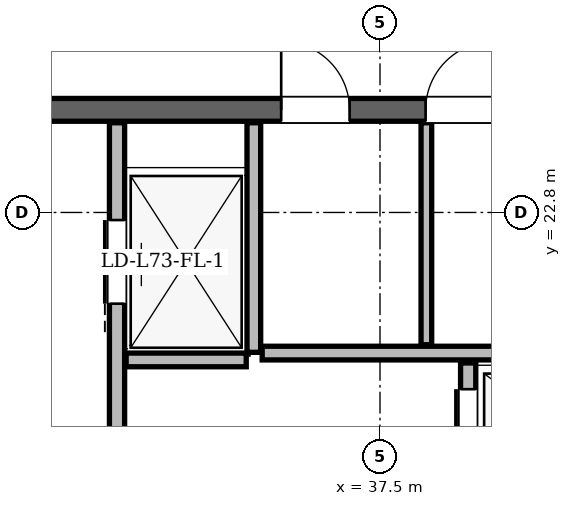
"""IFC4 building model, lengths in metres.
Left out: names, types, materials, properties, quantities, classifications, styles, units other than length and angle.
Written with IfcOpenShell. Run it as: python <this file> out.ifc"""

import sys

from ifc_helpers import new_model, si_unit, direction, frame, frame_2d, origin, place, context, subcontext, project, spatial, rectangle, extrude, element, fill, save


model = new_model("IFC4")
c1 = context("Model", 3, precision=1e-05, world=origin(), true_north=direction((0.0, 1.0)))
c2 = subcontext(c1, "Body", "Model", "MODEL_VIEW")
j1 = project(units=[si_unit("LENGTHUNIT", "METRE"), si_unit("PLANEANGLEUNIT", "RADIAN")], contexts=[c1])
p1 = place(None, origin())
s1 = spatial("IfcSite", under=j1, at=p1, CompositionType="ELEMENT")
p2 = place(p1, origin())
s2 = spatial("IfcBuilding", under=s1, at=p2, CompositionType="ELEMENT")
p3 = place(p2, frame((0.0, 0.0, 277.2)))
s3 = spatial("IfcBuildingStorey", under=s2, at=p3, CompositionType="ELEMENT", Elevation=277.2)
p4 = place(p3, frame((29.65, 24.15, 0.0), z_axis=(0.0, 0.0, 1.0), x_axis=(1.0, 0.0, 0.0)))
e1 = element("IfcWall", 1, at=p4, inside=s3, PredefinedType="SHEAR", context=c2, shape_type="SweptSolid", body=[
    extrude(rectangle(XDim=15.7, YDim=0.3, at=frame_2d((7.85, 0.0))), origin(), (0.0, 0.0, 1.0), 3.68),
])
p5 = place(p4, frame((1.7, 0.0, 0.0)))
e2 = element("IfcOpeningElement", 2, at=p5, cuts=e1, PredefinedType="OPENING", context=c2, shape_type="SweptSolid", body=[
    extrude(rectangle(XDim=1.2, YDim=2.2, at=frame_2d((0.6, 1.1))), frame((0.0, 0.15, 0.0), z_axis=(0.0, -1.0, 0.0), x_axis=(1.0, 0.0, 0.0)), (0.0, 0.0, 1.0), 0.3),
])
p6 = place(p4, frame((12.8, 0.0, 0.0)))
e3 = element("IfcOpeningElement", 3, at=p6, cuts=e1, PredefinedType="OPENING", context=c2, shape_type="SweptSolid", body=[
    extrude(rectangle(XDim=1.2, YDim=2.2, at=frame_2d((0.6, 1.1))), frame((0.0, 0.15, 0.0), z_axis=(0.0, -1.0, 0.0), x_axis=(1.0, 0.0, 0.0)), (0.0, 0.0, 1.0), 0.3),
])
p7 = place(p4, frame((6.55, 0.0, 0.0)))
e4 = element("IfcOpeningElement", 4, at=p7, cuts=e1, PredefinedType="OPENING", context=c2, shape_type="SweptSolid", body=[
    extrude(rectangle(XDim=0.9, YDim=2.05, at=frame_2d((0.45, 1.025))), frame((0.0, 0.15, 0.0), z_axis=(0.0, -1.0, 0.0), x_axis=(1.0, 0.0, 0.0)), (0.0, 0.0, 1.0), 0.3),
])
p8 = place(p4, frame((8.45, 0.0, 0.0)))
e5 = element("IfcOpeningElement", 5, at=p8, cuts=e1, PredefinedType="OPENING", context=c2, shape_type="SweptSolid", body=[
    extrude(rectangle(XDim=0.9, YDim=2.05, at=frame_2d((0.45, 1.025))), frame((0.0, 0.15, 0.0), z_axis=(0.0, -1.0, 0.0), x_axis=(1.0, 0.0, 0.0)), (0.0, 0.0, 1.0), 0.3),
])
p9 = place(p3, frame((35.202, 43.013, 0.0), z_axis=(0.0, 0.0, 1.0), x_axis=(-0.499998095684, -0.866026503239, 0.0)))
e6 = element("IfcWall", 6, at=p9, inside=s3, PredefinedType="SOLIDWALL", context=c2, shape_type="SweptSolid", body=[
    extrude(rectangle(XDim=37.389, YDim=0.29, at=frame_2d((18.695, 0.0))), origin(), (0.0, 0.0, 1.0), 3.058),
])
p10 = place(p9, frame((8.034, 0.0, 0.0)))
e7 = element("IfcOpeningElement", 7, at=p10, cuts=e6, PredefinedType="OPENING", context=c2, shape_type="SweptSolid", body=[
    extrude(rectangle(XDim=1.5, YDim=2.2, at=frame_2d((0.75, 1.1))), frame((0.0, 0.145, 0.0), z_axis=(0.0, -1.0, 0.0), x_axis=(1.0, 0.0, 0.0)), (0.0, 0.0, 1.0), 0.29),
])
p11 = place(p9, frame((32.25, 0.0, 0.0)))
e8 = element("IfcOpeningElement", 8, at=p11, cuts=e6, PredefinedType="OPENING", context=c2, shape_type="SweptSolid", body=[
    extrude(rectangle(XDim=1.5, YDim=2.2, at=frame_2d((0.75, 1.1))), frame((0.0, 0.145, 0.0), z_axis=(0.0, -1.0, 0.0), x_axis=(1.0, 0.0, 0.0)), (0.0, 0.0, 1.0), 0.29),
])
p12 = place(p9, frame((35.223, 0.0, 0.85)))
e9 = element("IfcOpeningElement", 9, at=p12, cuts=e6, PredefinedType="OPENING", context=c2, shape_type="SweptSolid", body=[
    extrude(rectangle(XDim=1.2, YDim=1.48, at=frame_2d((0.6, 0.74))), frame((0.0, 0.145, 0.0), z_axis=(0.0, -1.0, 0.0), x_axis=(1.0, 0.0, 0.0)), (0.0, 0.0, 1.0), 0.29),
])
p13 = place(p9, frame((29.461, 0.0, 0.85)))
e10 = element("IfcOpeningElement", 10, at=p13, cuts=e6, PredefinedType="OPENING", context=c2, shape_type="SweptSolid", body=[
    extrude(rectangle(XDim=1.2, YDim=1.48, at=frame_2d((0.6, 0.74))), frame((0.0, 0.145, 0.0), z_axis=(0.0, -1.0, 0.0), x_axis=(1.0, 0.0, 0.0)), (0.0, 0.0, 1.0), 0.29),
])
p14 = place(p9, frame((20.271, 0.0, 0.85)))
e11 = element("IfcOpeningElement", 11, at=p14, cuts=e6, PredefinedType="OPENING", context=c2, shape_type="SweptSolid", body=[
    extrude(rectangle(XDim=1.2, YDim=1.48, at=frame_2d((0.6, 0.74))), frame((0.0, 0.145, 0.0), z_axis=(0.0, -1.0, 0.0), x_axis=(1.0, 0.0, 0.0)), (0.0, 0.0, 1.0), 0.29),
])
p15 = place(p9, frame((22.555, 0.0, 0.85)))
e12 = element("IfcOpeningElement", 12, at=p15, cuts=e6, PredefinedType="OPENING", context=c2, shape_type="SweptSolid", body=[
    extrude(rectangle(XDim=1.2, YDim=1.48, at=frame_2d((0.6, 0.74))), frame((0.0, 0.145, 0.0), z_axis=(0.0, -1.0, 0.0), x_axis=(1.0, 0.0, 0.0)), (0.0, 0.0, 1.0), 0.29),
])
p16 = place(p9, frame((27.315, 0.0, 0.85)))
e13 = element("IfcOpeningElement", 13, at=p16, cuts=e6, PredefinedType="OPENING", context=c2, shape_type="SweptSolid", body=[
    extrude(rectangle(XDim=1.2, YDim=1.48, at=frame_2d((0.6, 0.74))), frame((0.0, 0.145, 0.0), z_axis=(0.0, -1.0, 0.0), x_axis=(1.0, 0.0, 0.0)), (0.0, 0.0, 1.0), 0.29),
])
p17 = place(p9, frame((3.242, 0.0, 0.85)))
e14 = element("IfcOpeningElement", 14, at=p17, cuts=e6, PredefinedType="OPENING", context=c2, shape_type="SweptSolid", body=[
    extrude(rectangle(XDim=1.2, YDim=1.48, at=frame_2d((0.6, 0.74))), frame((0.0, 0.145, 0.0), z_axis=(0.0, -1.0, 0.0), x_axis=(1.0, 0.0, 0.0)), (0.0, 0.0, 1.0), 0.29),
])
p18 = place(p3, frame((34.04, 19.48, 0.0), z_axis=(0.0, 0.0, 1.0), x_axis=(0.0, 1.0, 0.0)))
e15 = element("IfcWall", 15, at=p18, inside=s3, PredefinedType="PARTITIONING", context=c2, shape_type="SweptSolid", body=[
    extrude(rectangle(XDim=4.5, YDim=0.2, at=frame_2d((2.25, 0.0))), origin(), (0.0, 0.0, 1.0), 3.68),
])
p19 = place(p18, frame((2.12, 0.0, 0.0)))
e16 = element("IfcOpeningElement", 16, at=p19, cuts=e15, PredefinedType="OPENING", context=c2, shape_type="SweptSolid", body=[
    extrude(rectangle(XDim=1.1, YDim=2.2, at=frame_2d((0.55, 1.1))), frame((0.0, 0.1, 0.0), z_axis=(0.0, -1.0, 0.0), x_axis=(1.0, 0.0, 0.0)), (0.0, 0.0, 1.0), 0.2),
])
p20 = place(p3, frame((35.84, 20.96, 0.0), z_axis=(0.0, 0.0, 1.0), x_axis=(0.0, 1.0, 0.0)))
e17 = element("IfcWall", 17, at=p20, inside=s3, PredefinedType="PARTITIONING", context=c2, shape_type="SweptSolid", body=[
    extrude(rectangle(XDim=3.02, YDim=0.18, at=frame_2d((1.51, 0.0))), origin(), (0.0, 0.0, 1.0), 3.68),
])
p21 = place(p3, frame((34.16, 20.86, 0.0), z_axis=(0.0, 0.0, 1.0), x_axis=(1.0, 0.0, 0.0)))
e18 = element("IfcWall", 18, at=p21, inside=s3, PredefinedType="PARTITIONING", context=c2, shape_type="SweptSolid", body=[
    extrude(rectangle(XDim=1.58, YDim=0.18, at=frame_2d((0.79, 0.0))), origin(), (0.0, 0.0, 1.0), 3.68),
])
p22 = place(p3, frame((38.66, 17.2, 0.0), z_axis=(0.0, 0.0, 1.0), x_axis=(0.0, 1.0, 0.0)))
e19 = element("IfcWall", 19, at=p22, inside=s3, PredefinedType="PARTITIONING", context=c2, shape_type="SweptSolid", body=[
    extrude(rectangle(XDim=3.62, YDim=0.2, at=frame_2d((1.81, 0.0))), origin(), (0.0, 0.0, 1.0), 3.68),
])
p23 = place(p22, frame((0.425, 0.0, 0.0)))
e20 = element("IfcOpeningElement", 20, at=p23, cuts=e19, PredefinedType="OPENING", context=c2, shape_type="SweptSolid", body=[
    extrude(rectangle(XDim=1.05, YDim=2.15, at=frame_2d((0.525, 1.075))), frame((0.0, 0.1, 0.0), z_axis=(0.0, -1.0, 0.0), x_axis=(1.0, 0.0, 0.0)), (0.0, 0.0, 1.0), 0.2),
])
p24 = place(p22, frame((2.225, 0.0, 0.0)))
e21 = element("IfcOpeningElement", 21, at=p24, cuts=e19, PredefinedType="OPENING", context=c2, shape_type="SweptSolid", body=[
    extrude(rectangle(XDim=1.05, YDim=2.15, at=frame_2d((0.525, 1.075))), frame((0.0, 0.1, 0.0), z_axis=(0.0, -1.0, 0.0), x_axis=(1.0, 0.0, 0.0)), (0.0, 0.0, 1.0), 0.2),
])
p25 = place(p3, frame((35.95, 20.95, 0.0), z_axis=(0.0, 0.0, 1.0), x_axis=(1.0, 0.0, 0.0)))
e22 = element("IfcWall", 22, at=p25, inside=s3, PredefinedType="PARTITIONING", context=c2, shape_type="SweptSolid", body=[
    extrude(rectangle(XDim=3.1, YDim=0.18, at=frame_2d((1.55, 0.0))), origin(), (0.0, 0.0, 1.0), 3.68),
])
p26 = place(p3, frame((38.11, 21.06, 0.0), z_axis=(0.0, 0.0, 1.0), x_axis=(0.0, 1.0, 0.0)))
e23 = element("IfcWall", 23, at=p26, inside=s3, PredefinedType="PARTITIONING", context=c2, shape_type="SweptSolid", body=[
    extrude(rectangle(XDim=2.92, YDim=0.14, at=frame_2d((1.46, 0.0))), origin(), (0.0, 0.0, 1.0), 3.68),
])
p27 = place(p19, origin())
e24 = element("IfcDoor", 24, at=p27, inside=s3, OperationType="SLIDING_TO_LEFT", PredefinedType="DOOR", context=c2, shape_type="SweptSolid", body=[
    extrude(rectangle(XDim=1.1, YDim=2.2, at=frame_2d((0.55, 1.1))), frame((0.0, 0.025, 0.0), z_axis=(0.0, -1.0, 0.0), x_axis=(1.0, 0.0, 0.0)), (0.0, 0.0, 1.0), 0.05),
])
fill(e16, e24)
p28 = place(p24, origin())
e25 = element("IfcDoor", 25, at=p28, inside=s3, OperationType="SLIDING_TO_LEFT", PredefinedType="DOOR", context=c2, shape_type="SweptSolid", body=[
    extrude(rectangle(XDim=1.05, YDim=2.15, at=frame_2d((0.525, 1.075))), frame((0.0, 0.025, 0.0), z_axis=(0.0, -1.0, 0.0), x_axis=(1.0, 0.0, 0.0)), (0.0, 0.0, 1.0), 0.05),
])
fill(e21, e25)
p29 = place(p7, origin())
e26 = element("IfcDoor", 26, at=p29, inside=s3, OperationType="SINGLE_SWING_LEFT", PredefinedType="DOOR", context=c2, shape_type="SweptSolid", body=[
    extrude(rectangle(XDim=0.9, YDim=2.05, at=frame_2d((0.45, 1.025))), frame((0.0, 0.025, 0.0), z_axis=(0.0, -1.0, 0.0), x_axis=(1.0, 0.0, 0.0)), (0.0, 0.0, 1.0), 0.05),
])
fill(e4, e26)
p30 = place(p8, origin())
e27 = element("IfcDoor", 27, at=p30, inside=s3, OperationType="SINGLE_SWING_RIGHT", PredefinedType="DOOR", context=c2, shape_type="SweptSolid", body=[
    extrude(rectangle(XDim=0.9, YDim=2.05, at=frame_2d((0.45, 1.025))), frame((0.0, 0.025, 0.0), z_axis=(0.0, -1.0, 0.0), x_axis=(1.0, 0.0, 0.0)), (0.0, 0.0, 1.0), 0.05),
])
fill(e5, e27)
save(model, sys.argv[1])
